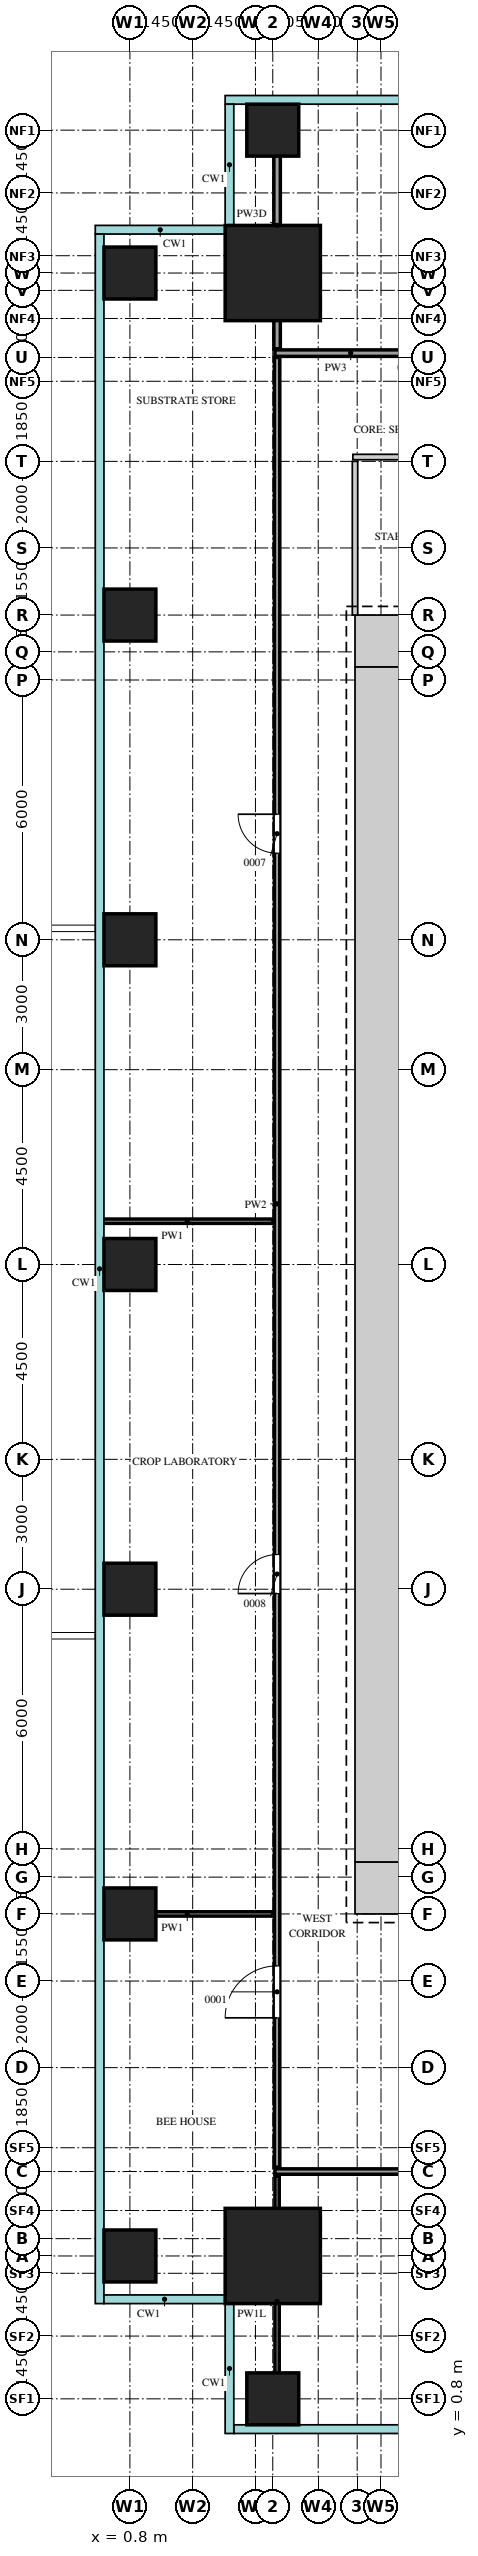
"""IFC4 building model, lengths in metres.
Left out: names, types, materials, properties, quantities, classifications, styles, units other than length and angle.
Written with IfcOpenShell. Run it as: python <this file> out.ifc"""

import sys

from ifc_helpers import new_model, si_unit, direction, frame, frame_2d, origin, origin_2d, place, context, subcontext, project, spatial, rectangle, extrude, source, transform, mapped, element, fill, save


model = new_model("IFC4")
c1 = context("Model", 3, precision=1e-05, world=origin(), true_north=direction((0.0, 1.0)))
c2 = subcontext(c1, "Body", "Model", "MODEL_VIEW")
j1 = project(units=[si_unit("LENGTHUNIT", "METRE"), si_unit("PLANEANGLEUNIT", "RADIAN")], contexts=[c1])
p1 = place(None, origin())
s1 = spatial("IfcSite", under=j1, at=p1, CompositionType="ELEMENT")
p2 = place(p1, origin())
s2 = spatial("IfcBuilding", under=s1, at=p2, CompositionType="ELEMENT")
p3 = place(p2, frame((0.0, 0.0, 78.0)))
s3 = spatial("IfcBuildingStorey", under=s2, at=p3, CompositionType="ELEMENT", Elevation=78.0)
m1 = source(origin(), c2, "Body", "SweptSolid", [
    extrude(rectangle(XDim=1.2, YDim=1.2, at=frame_2d((0.6, 0.0))), origin(), (0.0, 0.0, 1.0), 4.2),
])
for number, where, z_axis, x_axis in (
    (1, (6.0, 41.4, 0.0), (0.0, 0.0, 1.0), (1.0, 0.0, 0.0)),
    (2, (6.0, 12.6, 0.0), (0.0, 0.0, 1.0), (1.0, 0.0, 0.0)),
):
    element("IfcWall", number, at=place(p3, frame(where, z_axis=z_axis, x_axis=x_axis)), inside=s3, PredefinedType="SHEAR", context=c2, shape_type="MappedRepresentation", body=[
        mapped(m1, transform((0.0, 0.0, 0.0))),
    ])
m2 = source(origin(), c2, "Body", "SweptSolid", [
    extrude(rectangle(XDim=27.6, YDim=1.2, at=frame_2d((13.8, 0.0))), origin(), (0.0, 0.0, 1.0), 4.2),
])
p4 = place(p3, frame((6.6, 13.2, 0.0), z_axis=(0.0, 0.0, 1.0), x_axis=(0.0, 1.0, 0.0)))
e3 = element("IfcWall", 3, at=p4, inside=s3, PredefinedType="SHEAR", context=c2, shape_type="MappedRepresentation", body=[
    mapped(m2, transform((0.0, 0.0, 0.0))),
])
m3 = source(origin(), c2, "Body", "SweptSolid", [
    extrude(rectangle(XDim=2.2, YDim=2.2, at=origin_2d()), origin(), (0.0, 0.0, 1.0), 4.5),
])
for number, where, z_axis, x_axis in (
    (4, (4.1, 49.9, 0.0), (0.0, 0.0, 1.0), (1.0, 0.0, 0.0)),
    (5, (4.1, 4.1, 0.0), (0.0, 0.0, 1.0), (1.0, 0.0, 0.0)),
):
    element("IfcColumn", number, at=place(p3, frame(where, z_axis=z_axis, x_axis=x_axis)), inside=s3, PredefinedType="COLUMN", context=c2, shape_type="MappedRepresentation", body=[
        mapped(m3, transform((0.0, 0.0, 0.0))),
    ])
m4 = source(origin(), c2, "Body", "SweptSolid", [
    extrude(rectangle(XDim=1.2, YDim=1.2, at=origin_2d()), origin(), (0.0, 0.0, 1.0), 4.2),
])
for number, where, z_axis, x_axis in (
    (6, (4.1, 0.8, 0.0), (0.0, 0.0, 1.0), (1.0, 0.0, 0.0)),
    (7, (4.1, 53.2, 0.0), (0.0, 0.0, 1.0), (1.0, 0.0, 0.0)),
    (8, (0.8, 4.1, 0.0), (0.0, 0.0, 1.0), (1.0, 0.0, 0.0)),
    (9, (0.8, 12.0, 0.0), (0.0, 0.0, 1.0), (1.0, 0.0, 0.0)),
    (10, (0.8, 19.5, 0.0), (0.0, 0.0, 1.0), (1.0, 0.0, 0.0)),
    (11, (0.8, 27.0, 0.0), (0.0, 0.0, 1.0), (1.0, 0.0, 0.0)),
    (12, (0.8, 34.5, 0.0), (0.0, 0.0, 1.0), (1.0, 0.0, 0.0)),
    (13, (0.8, 42.0, 0.0), (0.0, 0.0, 1.0), (1.0, 0.0, 0.0)),
    (14, (0.8, 49.9, 0.0), (0.0, 0.0, 1.0), (1.0, 0.0, 0.0)),
):
    element("IfcColumn", number, at=place(p3, frame(where, z_axis=z_axis, x_axis=x_axis)), inside=s3, PredefinedType="COLUMN", context=c2, shape_type="MappedRepresentation", body=[
        mapped(m4, transform((0.0, 0.0, 0.0))),
    ])
m5 = source(origin(), c2, "Body", "SweptSolid", [
    extrude(rectangle(XDim=5.8, YDim=0.1, at=frame_2d((2.9, 0.0))), origin(), (0.0, 0.0, 1.0), 3.6),
])
p5 = place(p3, frame((4.2, 0.15, 0.0), z_axis=(0.0, 0.0, 1.0), x_axis=(0.0, 1.0, 0.0)))
e15 = element("IfcWall", 15, at=p5, inside=s3, PredefinedType="PARTITIONING", context=c2, shape_type="MappedRepresentation", body=[
    mapped(m5, transform((0.0, 0.0, 0.0))),
])
m6 = source(origin(), c2, "Body", "SweptSolid", [
    extrude(rectangle(XDim=22.15, YDim=0.125, at=frame_2d((11.075, 0.0))), origin(), (0.0, 0.0, 1.0), 4.3),
])
p6 = place(p3, frame((4.15, 6.05, 0.0), z_axis=(0.0, 0.0, 1.0), x_axis=(1.0, 0.0, 0.0)))
e16 = element("IfcWall", 16, at=p6, inside=s3, PredefinedType="PARTITIONING", context=c2, shape_type="MappedRepresentation", body=[
    mapped(m6, transform((0.0, 0.0, 0.0))),
])
m7 = source(origin(), c2, "Body", "SweptSolid", [
    extrude(rectangle(XDim=1.2, YDim=2.1, at=frame_2d((0.6, 1.05))), frame((0.0, 0.073, 0.0), z_axis=(0.0, -1.0, 0.0), x_axis=(1.0, 0.0, 0.0)), (0.0, 0.0, 1.0), 0.145),
])
p7 = place(p6, frame((9.2, 0.0, 0.0)))
e17 = element("IfcOpeningElement", 17, at=p7, cuts=e16, PredefinedType="OPENING", context=c2, shape_type="MappedRepresentation", body=[
    mapped(m7, transform((0.0, 0.0, 0.0))),
])
m8 = source(origin(), c2, "Body", "SweptSolid", [
    extrude(rectangle(XDim=41.8, YDim=0.125, at=frame_2d((20.9, 0.0))), origin(), (0.0, 0.0, 1.0), 4.3),
])
p8 = place(p3, frame((4.2, 6.15, 0.0), z_axis=(0.0, 0.0, 1.0), x_axis=(0.0, 1.0, 0.0)))
e18 = element("IfcWall", 18, at=p8, inside=s3, PredefinedType="PARTITIONING", context=c2, shape_type="MappedRepresentation", body=[
    mapped(m8, transform((0.0, 0.0, 0.0))),
])
p9 = place(p8, frame((3.45, 0.0, 0.0)))
e19 = element("IfcOpeningElement", 19, at=p9, cuts=e18, PredefinedType="OPENING", context=c2, shape_type="MappedRepresentation", body=[
    mapped(m7, transform((0.0, 0.0, 0.0))),
])
m9 = source(origin(), c2, "Body", "SweptSolid", [
    extrude(rectangle(XDim=0.9, YDim=2.1, at=frame_2d((0.45, 1.05))), frame((0.0, 0.073, 0.0), z_axis=(0.0, -1.0, 0.0), x_axis=(1.0, 0.0, 0.0)), (0.0, 0.0, 1.0), 0.145),
])
p10 = place(p8, frame((13.25, 0.0, 0.0)))
e20 = element("IfcOpeningElement", 20, at=p10, cuts=e18, PredefinedType="OPENING", context=c2, shape_type="MappedRepresentation", body=[
    mapped(m9, transform((0.0, 0.0, 0.0))),
])
p11 = place(p8, frame((30.35, 0.0, 0.0)))
e21 = element("IfcOpeningElement", 21, at=p11, cuts=e18, PredefinedType="OPENING", context=c2, shape_type="MappedRepresentation", body=[
    mapped(m9, transform((0.0, 0.0, 0.0))),
])
m10 = source(origin(), c2, "Body", "SweptSolid", [
    extrude(rectangle(XDim=3.95, YDim=0.1, at=frame_2d((1.975, 0.0))), origin(), (0.0, 0.0, 1.0), 4.3),
])
for number, where, z_axis, x_axis in (
    (22, (0.15, 12.0, 0.0), (0.0, 0.0, 1.0), (1.0, 0.0, 0.0)),
    (23, (0.15, 28.0, 0.0), (0.0, 0.0, 1.0), (1.0, 0.0, 0.0)),
):
    element("IfcWall", number, at=place(p3, frame(where, z_axis=z_axis, x_axis=x_axis)), inside=s3, PredefinedType="PARTITIONING", context=c2, shape_type="MappedRepresentation", body=[
        mapped(m10, transform((0.0, 0.0, 0.0))),
    ])
m11 = source(origin(), c2, "Body", "SweptSolid", [
    extrude(rectangle(XDim=3.55, YDim=0.125, at=frame_2d((1.775, 0.0))), origin(), (0.0, 0.0, 1.0), 4.3),
])
p12 = place(p3, frame((6.0, 42.0, 0.0), z_axis=(0.0, 0.0, 1.0), x_axis=(0.0, 1.0, 0.0)))
e24 = element("IfcWall", 24, at=p12, inside=s3, PredefinedType="PARTITIONING", context=c2, shape_type="MappedRepresentation", body=[
    mapped(m11, transform((0.0, 0.0, 0.0))),
])
m12 = source(origin(), c2, "Body", "SweptSolid", [
    extrude(rectangle(XDim=7.95, YDim=0.125, at=frame_2d((3.975, 0.0))), origin(), (0.0, 0.0, 1.0), 4.3),
])
p13 = place(p3, frame((5.95, 45.65, 0.0), z_axis=(0.0, 0.0, 1.0), x_axis=(1.0, 0.0, 0.0)))
e25 = element("IfcWall", 25, at=p13, inside=s3, PredefinedType="PARTITIONING", context=c2, shape_type="MappedRepresentation", body=[
    mapped(m12, transform((0.0, 0.0, 0.0))),
])
p14 = place(p13, frame((3.55, 0.0, 0.0)))
e26 = element("IfcOpeningElement", 26, at=p14, cuts=e25, PredefinedType="OPENING", context=c2, shape_type="MappedRepresentation", body=[
    mapped(m9, transform((0.0, 0.0, 0.0))),
])
m13 = source(origin(), c2, "Body", "SweptSolid", [
    extrude(rectangle(XDim=7.8, YDim=0.15, at=frame_2d((3.9, 0.0))), origin(), (0.0, 0.0, 1.0), 4.3),
])
p15 = place(p3, frame((4.15, 48.05, 0.0), z_axis=(0.0, 0.0, 1.0), x_axis=(1.0, 0.0, 0.0)))
e27 = element("IfcWall", 27, at=p15, inside=s3, PredefinedType="PARTITIONING", context=c2, shape_type="MappedRepresentation", body=[
    mapped(m13, transform((0.0, 0.0, 0.0))),
])
m14 = source(origin(), c2, "Body", "SweptSolid", [
    extrude(rectangle(XDim=0.9, YDim=2.1, at=frame_2d((0.45, 1.05))), frame((0.0, 0.085, 0.0), z_axis=(0.0, -1.0, 0.0), x_axis=(1.0, 0.0, 0.0)), (0.0, 0.0, 1.0), 0.17),
])
p16 = place(p15, frame((3.5, 0.0, 0.0)))
e28 = element("IfcOpeningElement", 28, at=p16, cuts=e27, PredefinedType="OPENING", context=c2, shape_type="MappedRepresentation", body=[
    mapped(m14, transform((0.0, 0.0, 0.0))),
])
m15 = source(origin(), c2, "Body", "SweptSolid", [
    extrude(rectangle(XDim=5.7, YDim=0.15, at=frame_2d((2.85, 0.0))), origin(), (0.0, 0.0, 1.0), 3.6),
])
p17 = place(p3, frame((4.2, 48.15, 0.0), z_axis=(0.0, 0.0, 1.0), x_axis=(0.0, 1.0, 0.0)))
e29 = element("IfcWall", 29, at=p17, inside=s3, PredefinedType="PARTITIONING", context=c2, shape_type="MappedRepresentation", body=[
    mapped(m15, transform((0.0, 0.0, 0.0))),
])
m16 = source(origin(), c2, "Body", "SweptSolid", [
    extrude(rectangle(XDim=1.2, YDim=2.1, at=frame_2d((0.6, 1.05))), frame((0.0, 0.025, 0.0), z_axis=(0.0, -1.0, 0.0), x_axis=(1.0, 0.0, 0.0)), (0.0, 0.0, 1.0), 0.05),
])
p18 = place(p9, origin())
e30 = element("IfcDoor", 30, at=p18, inside=s3, OperationType="SINGLE_SWING_RIGHT", PredefinedType="DOOR", context=c2, shape_type="MappedRepresentation", body=[
    mapped(m16, transform((0.0, 0.0, 0.0))),
])
fill(e19, e30)
m17 = source(origin(), c2, "Body", "SweptSolid", [
    extrude(rectangle(XDim=0.9, YDim=2.1, at=frame_2d((0.45, 1.05))), frame((0.0, 0.025, 0.0), z_axis=(0.0, -1.0, 0.0), x_axis=(1.0, 0.0, 0.0)), (0.0, 0.0, 1.0), 0.05),
])
p19 = place(p10, origin())
e31 = element("IfcDoor", 31, at=p19, inside=s3, OperationType="SINGLE_SWING_RIGHT", PredefinedType="DOOR", context=c2, shape_type="MappedRepresentation", body=[
    mapped(m17, transform((0.0, 0.0, 0.0))),
])
fill(e20, e31)
p20 = place(p11, origin())
e32 = element("IfcDoor", 32, at=p20, inside=s3, OperationType="SINGLE_SWING_LEFT", PredefinedType="DOOR", context=c2, shape_type="MappedRepresentation", body=[
    mapped(m17, transform((0.0, 0.0, 0.0))),
])
fill(e21, e32)
save(model, sys.argv[1])
